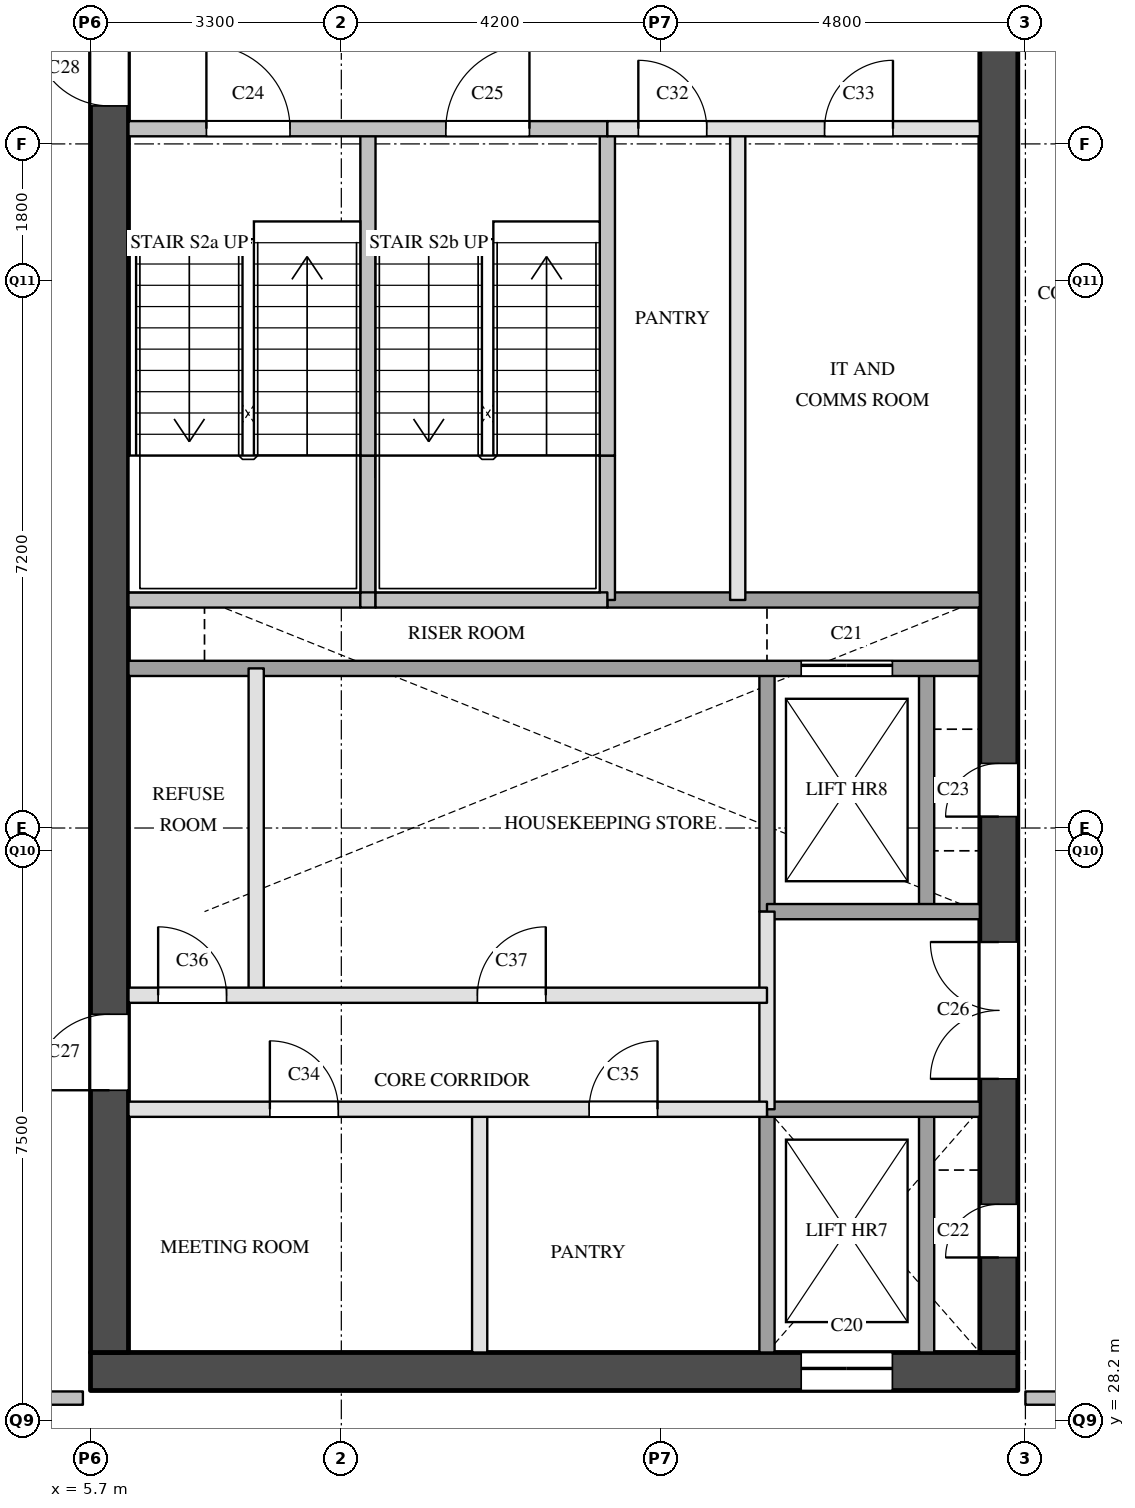
"""IFC4 building model, lengths in metres.
Left out: names, types, materials, properties, quantities, classifications, styles, units other than length and angle.
Written with IfcOpenShell. Run it as: python <this file> out.ifc"""

import sys

from ifc_helpers import new_model, si_unit, direction, frame, frame_2d, origin, place, context, subcontext, project, spatial, rectangle, extrude, element, fill, save


model = new_model("IFC4")
c1 = context("Model", 3, precision=1e-05, world=origin(), true_north=direction((0.0, 1.0)))
c2 = subcontext(c1, "Body", "Model", "MODEL_VIEW")
j1 = project(units=[si_unit("LENGTHUNIT", "METRE"), si_unit("PLANEANGLEUNIT", "RADIAN")], contexts=[c1])
p1 = place(None, origin())
s1 = spatial("IfcSite", under=j1, at=p1, CompositionType="ELEMENT")
p2 = place(p1, origin())
s2 = spatial("IfcBuilding", under=s1, at=p2, CompositionType="ELEMENT")
p3 = place(p2, frame((0.0, 0.0, 193.4)))
s3 = spatial("IfcBuildingStorey", under=s2, at=p3, CompositionType="ELEMENT", Elevation=193.4)
p4 = place(p3, frame((5.7, 28.85, 0.0), z_axis=(0.0, 0.0, 1.0), x_axis=(1.0, 0.0, 0.0)))
e1 = element("IfcWall", 1, at=p4, inside=s3, PredefinedType="SHEAR", context=c2, shape_type="SweptSolid", body=[
    extrude(rectangle(XDim=12.2, YDim=0.5, at=frame_2d((6.1, 0.0))), origin(), (0.0, 0.0, 1.0), 3.4),
])
p5 = place(p4, frame((9.35, 0.0, 0.0)))
e2 = element("IfcOpeningElement", 2, at=p5, cuts=e1, PredefinedType="OPENING", context=c2, shape_type="SweptSolid", body=[
    extrude(rectangle(XDim=1.2, YDim=2.1, at=frame_2d((0.6, 1.05))), frame((0.0, 0.26, 0.0), z_axis=(0.0, -1.0, 0.0), x_axis=(1.0, 0.0, 0.0)), (0.0, 0.0, 1.0), 0.52),
])
p6 = place(p3, frame((5.95, 29.1, 0.0), z_axis=(0.0, 0.0, 1.0), x_axis=(0.0, 1.0, 0.0)))
e3 = element("IfcWall", 3, at=p6, inside=s3, PredefinedType="SHEAR", context=c2, shape_type="SweptSolid", body=[
    extrude(rectangle(XDim=20.3, YDim=0.5, at=frame_2d((10.15, 0.0))), origin(), (0.0, 0.0, 1.0), 3.4),
])
p7 = place(p6, frame((3.45, 0.0, 0.0)))
e4 = element("IfcOpeningElement", 4, at=p7, cuts=e3, PredefinedType="OPENING", context=c2, shape_type="SweptSolid", body=[
    extrude(rectangle(XDim=1.0, YDim=2.1, at=frame_2d((0.5, 1.05))), frame((0.0, 0.26, 0.0), z_axis=(0.0, -1.0, 0.0), x_axis=(1.0, 0.0, 0.0)), (0.0, 0.0, 1.0), 0.52),
])
p8 = place(p6, frame((16.4, 0.0, 0.0)))
e5 = element("IfcOpeningElement", 5, at=p8, cuts=e3, PredefinedType="OPENING", context=c2, shape_type="SweptSolid", body=[
    extrude(rectangle(XDim=1.0, YDim=2.1, at=frame_2d((0.5, 1.05))), frame((0.0, 0.26, 0.0), z_axis=(0.0, -1.0, 0.0), x_axis=(1.0, 0.0, 0.0)), (0.0, 0.0, 1.0), 0.52),
])
p9 = place(p3, frame((17.65, 29.1, 0.0), z_axis=(0.0, 0.0, 1.0), x_axis=(0.0, 1.0, 0.0)))
e6 = element("IfcWall", 6, at=p9, inside=s3, PredefinedType="SHEAR", context=c2, shape_type="SweptSolid", body=[
    extrude(rectangle(XDim=20.3, YDim=0.5, at=frame_2d((10.15, 0.0))), origin(), (0.0, 0.0, 1.0), 3.4),
])
p10 = place(p9, frame((1.25, 0.0, 0.0)))
e7 = element("IfcOpeningElement", 7, at=p10, cuts=e6, PredefinedType="OPENING", context=c2, shape_type="SweptSolid", body=[
    extrude(rectangle(XDim=0.7, YDim=2.1, at=frame_2d((0.35, 1.05))), frame((0.0, 0.26, 0.0), z_axis=(0.0, -1.0, 0.0), x_axis=(1.0, 0.0, 0.0)), (0.0, 0.0, 1.0), 0.52),
])
p11 = place(p9, frame((7.05, 0.0, 0.0)))
e8 = element("IfcOpeningElement", 8, at=p11, cuts=e6, PredefinedType="OPENING", context=c2, shape_type="SweptSolid", body=[
    extrude(rectangle(XDim=0.7, YDim=2.1, at=frame_2d((0.35, 1.05))), frame((0.0, 0.26, 0.0), z_axis=(0.0, -1.0, 0.0), x_axis=(1.0, 0.0, 0.0)), (0.0, 0.0, 1.0), 0.52),
])
p12 = place(p9, frame((3.6, 0.0, 0.0)))
e9 = element("IfcOpeningElement", 9, at=p12, cuts=e6, PredefinedType="OPENING", context=c2, shape_type="SweptSolid", body=[
    extrude(rectangle(XDim=1.8, YDim=2.1, at=frame_2d((0.9, 1.05))), frame((0.0, 0.26, 0.0), z_axis=(0.0, -1.0, 0.0), x_axis=(1.0, 0.0, 0.0)), (0.0, 0.0, 1.0), 0.52),
])
p13 = place(p3, frame((7.88, 33.8, 0.0), z_axis=(0.0, 0.0, 1.0), x_axis=(0.0, 1.0, 0.0)))
e10 = element("IfcWall", 10, at=p13, inside=s3, PredefinedType="PARTITIONING", context=c2, shape_type="SweptSolid", body=[
    extrude(rectangle(XDim=4.3, YDim=0.2, at=frame_2d((2.15, 0.0))), origin(), (0.0, 0.0, 1.0), 3.4),
])
p14 = place(p3, frame((9.35, 39.0, 0.0), z_axis=(0.0, 0.0, 1.0), x_axis=(0.0, 1.0, 0.0)))
e11 = element("IfcWall", 11, at=p14, inside=s3, PredefinedType="SOLIDWALL", context=c2, shape_type="SweptSolid", body=[
    extrude(rectangle(XDim=1.9, YDim=0.2, at=frame_2d((0.95, 0.0))), origin(), (0.0, 0.0, 1.0), 3.4),
])
p15 = place(p3, frame((9.35, 40.9, 0.0), z_axis=(0.0, 0.0, 1.0), x_axis=(0.0, 1.0, 0.0)))
e12 = element("IfcWall", 12, at=p15, inside=s3, PredefinedType="SOLIDWALL", context=c2, shape_type="SweptSolid", body=[
    extrude(rectangle(XDim=4.3, YDim=0.2, at=frame_2d((2.15, 0.0))), origin(), (0.0, 0.0, 1.0), 3.4),
])
p16 = place(p3, frame((10.82, 29.1, 0.0), z_axis=(0.0, 0.0, 1.0), x_axis=(0.0, 1.0, 0.0)))
e13 = element("IfcWall", 13, at=p16, inside=s3, PredefinedType="PARTITIONING", context=c2, shape_type="SweptSolid", body=[
    extrude(rectangle(XDim=3.2, YDim=0.2, at=frame_2d((1.6, 0.0))), origin(), (0.0, 0.0, 1.0), 3.4),
])
p17 = place(p3, frame((12.5, 39.0, 0.0), z_axis=(0.0, 0.0, 1.0), x_axis=(0.0, 1.0, 0.0)))
e14 = element("IfcWall", 14, at=p17, inside=s3, PredefinedType="SOLIDWALL", context=c2, shape_type="SweptSolid", body=[
    extrude(rectangle(XDim=1.9, YDim=0.2, at=frame_2d((0.95, 0.0))), origin(), (0.0, 0.0, 1.0), 3.4),
])
p18 = place(p3, frame((12.5, 40.9, 0.0), z_axis=(0.0, 0.0, 1.0), x_axis=(0.0, 1.0, 0.0)))
e15 = element("IfcWall", 15, at=p18, inside=s3, PredefinedType="SOLIDWALL", context=c2, shape_type="SweptSolid", body=[
    extrude(rectangle(XDim=4.3, YDim=0.2, at=frame_2d((2.15, 0.0))), origin(), (0.0, 0.0, 1.0), 3.4),
])
p19 = place(p3, frame((14.215, 39.0, 0.0), z_axis=(0.0, 0.0, 1.0), x_axis=(0.0, 1.0, 0.0)))
e16 = element("IfcWall", 16, at=p19, inside=s3, PredefinedType="PARTITIONING", context=c2, shape_type="SweptSolid", body=[
    extrude(rectangle(XDim=6.2, YDim=0.2, at=frame_2d((3.1, 0.0))), origin(), (0.0, 0.0, 1.0), 3.4),
])
p20 = place(p3, frame((14.6, 32.3, 0.0), z_axis=(0.0, 0.0, 1.0), x_axis=(0.0, 1.0, 0.0)))
e17 = element("IfcWall", 17, at=p20, inside=s3, PredefinedType="PARTITIONING", context=c2, shape_type="SweptSolid", body=[
    extrude(rectangle(XDim=2.6, YDim=0.2, at=frame_2d((1.3, 0.0))), origin(), (0.0, 0.0, 1.0), 3.4),
])
p21 = place(p3, frame((14.6, 29.1, 0.0), z_axis=(0.0, 0.0, 1.0), x_axis=(0.0, 1.0, 0.0)))
e18 = element("IfcWall", 18, at=p21, inside=s3, PredefinedType="SOLIDWALL", context=c2, shape_type="SweptSolid", body=[
    extrude(rectangle(XDim=3.2, YDim=0.2, at=frame_2d((1.6, 0.0))), origin(), (0.0, 0.0, 1.0), 3.4),
])
p22 = place(p3, frame((14.6, 34.9, 0.0), z_axis=(0.0, 0.0, 1.0), x_axis=(0.0, 1.0, 0.0)))
e19 = element("IfcWall", 19, at=p22, inside=s3, PredefinedType="SOLIDWALL", context=c2, shape_type="SweptSolid", body=[
    extrude(rectangle(XDim=3.2, YDim=0.2, at=frame_2d((1.6, 0.0))), origin(), (0.0, 0.0, 1.0), 3.4),
])
p23 = place(p3, frame((16.7, 29.1, 0.0), z_axis=(0.0, 0.0, 1.0), x_axis=(0.0, 1.0, 0.0)))
e20 = element("IfcWall", 20, at=p23, inside=s3, PredefinedType="SOLIDWALL", context=c2, shape_type="SweptSolid", body=[
    extrude(rectangle(XDim=3.2, YDim=0.2, at=frame_2d((1.6, 0.0))), origin(), (0.0, 0.0, 1.0), 3.4),
])
p24 = place(p3, frame((16.7, 34.9, 0.0), z_axis=(0.0, 0.0, 1.0), x_axis=(0.0, 1.0, 0.0)))
e21 = element("IfcWall", 21, at=p24, inside=s3, PredefinedType="SOLIDWALL", context=c2, shape_type="SweptSolid", body=[
    extrude(rectangle(XDim=3.2, YDim=0.2, at=frame_2d((1.6, 0.0))), origin(), (0.0, 0.0, 1.0), 3.4),
])
p25 = place(p3, frame((6.2, 32.3, 0.0), z_axis=(0.0, 0.0, 1.0), x_axis=(1.0, 0.0, 0.0)))
e22 = element("IfcWall", 22, at=p25, inside=s3, PredefinedType="PARTITIONING", context=c2, shape_type="SweptSolid", body=[
    extrude(rectangle(XDim=8.4, YDim=0.2, at=frame_2d((4.2, 0.0))), origin(), (0.0, 0.0, 1.0), 3.4),
])
p26 = place(p25, frame((1.86, 0.0, 0.0)))
e23 = element("IfcOpeningElement", 23, at=p26, cuts=e22, PredefinedType="OPENING", context=c2, shape_type="SweptSolid", body=[
    extrude(rectangle(XDim=0.9, YDim=2.1, at=frame_2d((0.45, 1.05))), frame((0.0, 0.11, 0.0), z_axis=(0.0, -1.0, 0.0), x_axis=(1.0, 0.0, 0.0)), (0.0, 0.0, 1.0), 0.22),
])
p27 = place(p25, frame((6.06, 0.0, 0.0)))
e24 = element("IfcOpeningElement", 24, at=p27, cuts=e22, PredefinedType="OPENING", context=c2, shape_type="SweptSolid", body=[
    extrude(rectangle(XDim=0.9, YDim=2.1, at=frame_2d((0.45, 1.05))), frame((0.0, 0.11, 0.0), z_axis=(0.0, -1.0, 0.0), x_axis=(1.0, 0.0, 0.0)), (0.0, 0.0, 1.0), 0.22),
])
p28 = place(p3, frame((14.6, 32.3, 0.0), z_axis=(0.0, 0.0, 1.0), x_axis=(1.0, 0.0, 0.0)))
e25 = element("IfcWall", 25, at=p28, inside=s3, PredefinedType="SOLIDWALL", context=c2, shape_type="SweptSolid", body=[
    extrude(rectangle(XDim=2.8, YDim=0.2, at=frame_2d((1.4, 0.0))), origin(), (0.0, 0.0, 1.0), 3.4),
])
p29 = place(p3, frame((6.2, 33.8, 0.0), z_axis=(0.0, 0.0, 1.0), x_axis=(1.0, 0.0, 0.0)))
e26 = element("IfcWall", 26, at=p29, inside=s3, PredefinedType="PARTITIONING", context=c2, shape_type="SweptSolid", body=[
    extrude(rectangle(XDim=8.4, YDim=0.2, at=frame_2d((4.2, 0.0))), origin(), (0.0, 0.0, 1.0), 3.4),
])
p30 = place(p29, frame((0.39, 0.0, 0.0)))
e27 = element("IfcOpeningElement", 27, at=p30, cuts=e26, PredefinedType="OPENING", context=c2, shape_type="SweptSolid", body=[
    extrude(rectangle(XDim=0.9, YDim=2.1, at=frame_2d((0.45, 1.05))), frame((0.0, 0.11, 0.0), z_axis=(0.0, -1.0, 0.0), x_axis=(1.0, 0.0, 0.0)), (0.0, 0.0, 1.0), 0.22),
])
p31 = place(p29, frame((4.59, 0.0, 0.0)))
e28 = element("IfcOpeningElement", 28, at=p31, cuts=e26, PredefinedType="OPENING", context=c2, shape_type="SweptSolid", body=[
    extrude(rectangle(XDim=0.9, YDim=2.1, at=frame_2d((0.45, 1.05))), frame((0.0, 0.11, 0.0), z_axis=(0.0, -1.0, 0.0), x_axis=(1.0, 0.0, 0.0)), (0.0, 0.0, 1.0), 0.22),
])
p32 = place(p3, frame((14.6, 34.9, 0.0), z_axis=(0.0, 0.0, 1.0), x_axis=(1.0, 0.0, 0.0)))
e29 = element("IfcWall", 29, at=p32, inside=s3, PredefinedType="SOLIDWALL", context=c2, shape_type="SweptSolid", body=[
    extrude(rectangle(XDim=2.8, YDim=0.2, at=frame_2d((1.4, 0.0))), origin(), (0.0, 0.0, 1.0), 3.4),
])
p33 = place(p3, frame((6.2, 38.1, 0.0), z_axis=(0.0, 0.0, 1.0), x_axis=(1.0, 0.0, 0.0)))
e30 = element("IfcWall", 30, at=p33, inside=s3, PredefinedType="SOLIDWALL", context=c2, shape_type="SweptSolid", body=[
    extrude(rectangle(XDim=11.2, YDim=0.2, at=frame_2d((5.6, 0.0))), origin(), (0.0, 0.0, 1.0), 3.4),
])
p34 = place(p33, frame((8.85, 0.0, 0.0)))
e31 = element("IfcOpeningElement", 31, at=p34, cuts=e30, PredefinedType="OPENING", context=c2, shape_type="SweptSolid", body=[
    extrude(rectangle(XDim=1.2, YDim=2.1, at=frame_2d((0.6, 1.05))), frame((0.0, 0.11, 0.0), z_axis=(0.0, -1.0, 0.0), x_axis=(1.0, 0.0, 0.0)), (0.0, 0.0, 1.0), 0.22),
])
p35 = place(p3, frame((12.5, 39.0, 0.0), z_axis=(0.0, 0.0, 1.0), x_axis=(1.0, 0.0, 0.0)))
e32 = element("IfcWall", 32, at=p35, inside=s3, PredefinedType="SOLIDWALL", context=c2, shape_type="SweptSolid", body=[
    extrude(rectangle(XDim=4.9, YDim=0.2, at=frame_2d((2.45, 0.0))), origin(), (0.0, 0.0, 1.0), 3.4),
])
p36 = place(p3, frame((6.2, 39.0, 0.0), z_axis=(0.0, 0.0, 1.0), x_axis=(1.0, 0.0, 0.0)))
e33 = element("IfcWall", 33, at=p36, inside=s3, PredefinedType="SOLIDWALL", context=c2, shape_type="SweptSolid", body=[
    extrude(rectangle(XDim=3.05, YDim=0.2, at=frame_2d((1.525, 0.0))), origin(), (0.0, 0.0, 1.0), 3.4),
])
p37 = place(p3, frame((9.25, 39.0, 0.0), z_axis=(0.0, 0.0, 1.0), x_axis=(1.0, 0.0, 0.0)))
e34 = element("IfcWall", 34, at=p37, inside=s3, PredefinedType="SOLIDWALL", context=c2, shape_type="SweptSolid", body=[
    extrude(rectangle(XDim=0.2, YDim=0.2, at=frame_2d((0.1, 0.0))), origin(), (0.0, 0.0, 1.0), 3.4),
])
p38 = place(p3, frame((9.45, 39.0, 0.0), z_axis=(0.0, 0.0, 1.0), x_axis=(1.0, 0.0, 0.0)))
e35 = element("IfcWall", 35, at=p38, inside=s3, PredefinedType="SOLIDWALL", context=c2, shape_type="SweptSolid", body=[
    extrude(rectangle(XDim=3.05, YDim=0.2, at=frame_2d((1.525, 0.0))), origin(), (0.0, 0.0, 1.0), 3.4),
])
p39 = place(p3, frame((12.5, 45.2, 0.0), z_axis=(0.0, 0.0, 1.0), x_axis=(1.0, 0.0, 0.0)))
e36 = element("IfcWall", 36, at=p39, inside=s3, PredefinedType="PARTITIONING", context=c2, shape_type="SweptSolid", body=[
    extrude(rectangle(XDim=4.9, YDim=0.2, at=frame_2d((2.45, 0.0))), origin(), (0.0, 0.0, 1.0), 3.4),
])
p40 = place(p39, frame((0.407, 0.0, 0.0)))
e37 = element("IfcOpeningElement", 37, at=p40, cuts=e36, PredefinedType="OPENING", context=c2, shape_type="SweptSolid", body=[
    extrude(rectangle(XDim=0.9, YDim=2.1, at=frame_2d((0.45, 1.05))), frame((0.0, 0.11, 0.0), z_axis=(0.0, -1.0, 0.0), x_axis=(1.0, 0.0, 0.0)), (0.0, 0.0, 1.0), 0.22),
])
p41 = place(p39, frame((2.857, 0.0, 0.0)))
e38 = element("IfcOpeningElement", 38, at=p41, cuts=e36, PredefinedType="OPENING", context=c2, shape_type="SweptSolid", body=[
    extrude(rectangle(XDim=0.9, YDim=2.1, at=frame_2d((0.45, 1.05))), frame((0.0, 0.11, 0.0), z_axis=(0.0, -1.0, 0.0), x_axis=(1.0, 0.0, 0.0)), (0.0, 0.0, 1.0), 0.22),
])
p42 = place(p3, frame((6.2, 45.2, 0.0), z_axis=(0.0, 0.0, 1.0), x_axis=(1.0, 0.0, 0.0)))
e39 = element("IfcWall", 39, at=p42, inside=s3, PredefinedType="SOLIDWALL", context=c2, shape_type="SweptSolid", body=[
    extrude(rectangle(XDim=6.3, YDim=0.2, at=frame_2d((3.15, 0.0))), origin(), (0.0, 0.0, 1.0), 3.4),
])
p43 = place(p42, frame((1.025, 0.0, 0.0)))
e40 = element("IfcOpeningElement", 40, at=p43, cuts=e39, PredefinedType="OPENING", context=c2, shape_type="SweptSolid", body=[
    extrude(rectangle(XDim=1.1, YDim=2.1, at=frame_2d((0.55, 1.05))), frame((0.0, 0.11, 0.0), z_axis=(0.0, -1.0, 0.0), x_axis=(1.0, 0.0, 0.0)), (0.0, 0.0, 1.0), 0.22),
])
p44 = place(p42, frame((4.175, 0.0, 0.0)))
e41 = element("IfcOpeningElement", 41, at=p44, cuts=e39, PredefinedType="OPENING", context=c2, shape_type="SweptSolid", body=[
    extrude(rectangle(XDim=1.1, YDim=2.1, at=frame_2d((0.55, 1.05))), frame((0.0, 0.11, 0.0), z_axis=(0.0, -1.0, 0.0), x_axis=(1.0, 0.0, 0.0)), (0.0, 0.0, 1.0), 0.22),
])
for number, where, z_axis, x_axis in (
    (42, (4.1, 28.5, 0.0), (0.0, 0.0, 1.0), (1.0, 0.0, 0.0)),
    (43, (18.0, 28.5, 0.0), (0.0, 0.0, 1.0), (1.0, 0.0, 0.0)),
):
    element("IfcWall", number, at=place(p3, frame(where, z_axis=z_axis, x_axis=x_axis)), inside=s3, PredefinedType="PARTITIONING", context=c2, shape_type="SweptSolid", body=[
        extrude(rectangle(XDim=1.5, YDim=0.175, at=frame_2d((0.75, 0.0))), origin(), (0.0, 0.0, 1.0), 3.4),
    ])
p45 = place(p5, origin())
e44 = element("IfcDoor", 44, at=p45, inside=s3, OperationType="SLIDING_TO_LEFT", PredefinedType="DOOR", context=c2, shape_type="SweptSolid", body=[
    extrude(rectangle(XDim=1.2, YDim=2.1, at=frame_2d((0.6, 1.05))), frame((0.0, 0.025, 0.0), z_axis=(0.0, -1.0, 0.0), x_axis=(1.0, 0.0, 0.0)), (0.0, 0.0, 1.0), 0.05),
])
fill(e2, e44)
p46 = place(p34, origin())
e45 = element("IfcDoor", 45, at=p46, inside=s3, OperationType="SLIDING_TO_LEFT", PredefinedType="DOOR", context=c2, shape_type="SweptSolid", body=[
    extrude(rectangle(XDim=1.2, YDim=2.1, at=frame_2d((0.6, 1.05))), frame((0.0, 0.025, 0.0), z_axis=(0.0, -1.0, 0.0), x_axis=(1.0, 0.0, 0.0)), (0.0, 0.0, 1.0), 0.05),
])
fill(e31, e45)
p47 = place(p10, origin())
e46 = element("IfcDoor", 46, at=p47, inside=s3, OperationType="SINGLE_SWING_LEFT", PredefinedType="DOOR", context=c2, shape_type="SweptSolid", body=[
    extrude(rectangle(XDim=0.7, YDim=2.1, at=frame_2d((0.35, 1.05))), frame((0.0, 0.025, 0.0), z_axis=(0.0, -1.0, 0.0), x_axis=(1.0, 0.0, 0.0)), (0.0, 0.0, 1.0), 0.05),
])
fill(e7, e46)
p48 = place(p11, origin())
e47 = element("IfcDoor", 47, at=p48, inside=s3, OperationType="SINGLE_SWING_LEFT", PredefinedType="DOOR", context=c2, shape_type="SweptSolid", body=[
    extrude(rectangle(XDim=0.7, YDim=2.1, at=frame_2d((0.35, 1.05))), frame((0.0, 0.025, 0.0), z_axis=(0.0, -1.0, 0.0), x_axis=(1.0, 0.0, 0.0)), (0.0, 0.0, 1.0), 0.05),
])
fill(e8, e47)
p49 = place(p43, origin())
e48 = element("IfcDoor", 48, at=p49, inside=s3, OperationType="SINGLE_SWING_LEFT", PredefinedType="DOOR", context=c2, shape_type="SweptSolid", body=[
    extrude(rectangle(XDim=1.1, YDim=2.1, at=frame_2d((0.55, 1.05))), frame((0.0, 0.025, 0.0), z_axis=(0.0, -1.0, 0.0), x_axis=(1.0, 0.0, 0.0)), (0.0, 0.0, 1.0), 0.05),
])
fill(e40, e48)
p50 = place(p44, origin())
e49 = element("IfcDoor", 49, at=p50, inside=s3, OperationType="SINGLE_SWING_RIGHT", PredefinedType="DOOR", context=c2, shape_type="SweptSolid", body=[
    extrude(rectangle(XDim=1.1, YDim=2.1, at=frame_2d((0.55, 1.05))), frame((0.0, 0.025, 0.0), z_axis=(0.0, -1.0, 0.0), x_axis=(1.0, 0.0, 0.0)), (0.0, 0.0, 1.0), 0.05),
])
fill(e41, e49)
p51 = place(p12, origin())
e50 = element("IfcDoor", 50, at=p51, inside=s3, OperationType="DOUBLE_DOOR_SINGLE_SWING", PredefinedType="DOOR", context=c2, shape_type="SweptSolid", body=[
    extrude(rectangle(XDim=1.8, YDim=2.1, at=frame_2d((0.9, 1.05))), frame((0.0, 0.025, 0.0), z_axis=(0.0, -1.0, 0.0), x_axis=(1.0, 0.0, 0.0)), (0.0, 0.0, 1.0), 0.05),
])
fill(e9, e50)
p52 = place(p7, origin())
e51 = element("IfcDoor", 51, at=p52, inside=s3, OperationType="SINGLE_SWING_LEFT", PredefinedType="DOOR", context=c2, shape_type="SweptSolid", body=[
    extrude(rectangle(XDim=1.0, YDim=2.1, at=frame_2d((0.5, 1.05))), frame((0.0, 0.025, 0.0), z_axis=(0.0, -1.0, 0.0), x_axis=(1.0, 0.0, 0.0)), (0.0, 0.0, 1.0), 0.05),
])
fill(e4, e51)
p53 = place(p8, origin())
e52 = element("IfcDoor", 52, at=p53, inside=s3, OperationType="SINGLE_SWING_RIGHT", PredefinedType="DOOR", context=c2, shape_type="SweptSolid", body=[
    extrude(rectangle(XDim=1.0, YDim=2.1, at=frame_2d((0.5, 1.05))), frame((0.0, 0.025, 0.0), z_axis=(0.0, -1.0, 0.0), x_axis=(1.0, 0.0, 0.0)), (0.0, 0.0, 1.0), 0.05),
])
fill(e5, e52)
p54 = place(p40, origin())
e53 = element("IfcDoor", 53, at=p54, inside=s3, OperationType="SINGLE_SWING_LEFT", PredefinedType="DOOR", context=c2, shape_type="SweptSolid", body=[
    extrude(rectangle(XDim=0.9, YDim=2.1, at=frame_2d((0.45, 1.05))), frame((0.0, 0.025, 0.0), z_axis=(0.0, -1.0, 0.0), x_axis=(1.0, 0.0, 0.0)), (0.0, 0.0, 1.0), 0.05),
])
fill(e37, e53)
p55 = place(p41, origin())
e54 = element("IfcDoor", 54, at=p55, inside=s3, OperationType="SINGLE_SWING_RIGHT", PredefinedType="DOOR", context=c2, shape_type="SweptSolid", body=[
    extrude(rectangle(XDim=0.9, YDim=2.1, at=frame_2d((0.45, 1.05))), frame((0.0, 0.025, 0.0), z_axis=(0.0, -1.0, 0.0), x_axis=(1.0, 0.0, 0.0)), (0.0, 0.0, 1.0), 0.05),
])
fill(e38, e54)
p56 = place(p26, origin())
e55 = element("IfcDoor", 55, at=p56, inside=s3, OperationType="SINGLE_SWING_LEFT", PredefinedType="DOOR", context=c2, shape_type="SweptSolid", body=[
    extrude(rectangle(XDim=0.9, YDim=2.1, at=frame_2d((0.45, 1.05))), frame((0.0, 0.025, 0.0), z_axis=(0.0, -1.0, 0.0), x_axis=(1.0, 0.0, 0.0)), (0.0, 0.0, 1.0), 0.05),
])
fill(e23, e55)
p57 = place(p27, origin())
e56 = element("IfcDoor", 56, at=p57, inside=s3, OperationType="SINGLE_SWING_RIGHT", PredefinedType="DOOR", context=c2, shape_type="SweptSolid", body=[
    extrude(rectangle(XDim=0.9, YDim=2.1, at=frame_2d((0.45, 1.05))), frame((0.0, 0.025, 0.0), z_axis=(0.0, -1.0, 0.0), x_axis=(1.0, 0.0, 0.0)), (0.0, 0.0, 1.0), 0.05),
])
fill(e24, e56)
p58 = place(p30, origin())
e57 = element("IfcDoor", 57, at=p58, inside=s3, OperationType="SINGLE_SWING_LEFT", PredefinedType="DOOR", context=c2, shape_type="SweptSolid", body=[
    extrude(rectangle(XDim=0.9, YDim=2.1, at=frame_2d((0.45, 1.05))), frame((0.0, 0.025, 0.0), z_axis=(0.0, -1.0, 0.0), x_axis=(1.0, 0.0, 0.0)), (0.0, 0.0, 1.0), 0.05),
])
fill(e27, e57)
p59 = place(p31, origin())
e58 = element("IfcDoor", 58, at=p59, inside=s3, OperationType="SINGLE_SWING_RIGHT", PredefinedType="DOOR", context=c2, shape_type="SweptSolid", body=[
    extrude(rectangle(XDim=0.9, YDim=2.1, at=frame_2d((0.45, 1.05))), frame((0.0, 0.025, 0.0), z_axis=(0.0, -1.0, 0.0), x_axis=(1.0, 0.0, 0.0)), (0.0, 0.0, 1.0), 0.05),
])
fill(e28, e58)
save(model, sys.argv[1])
